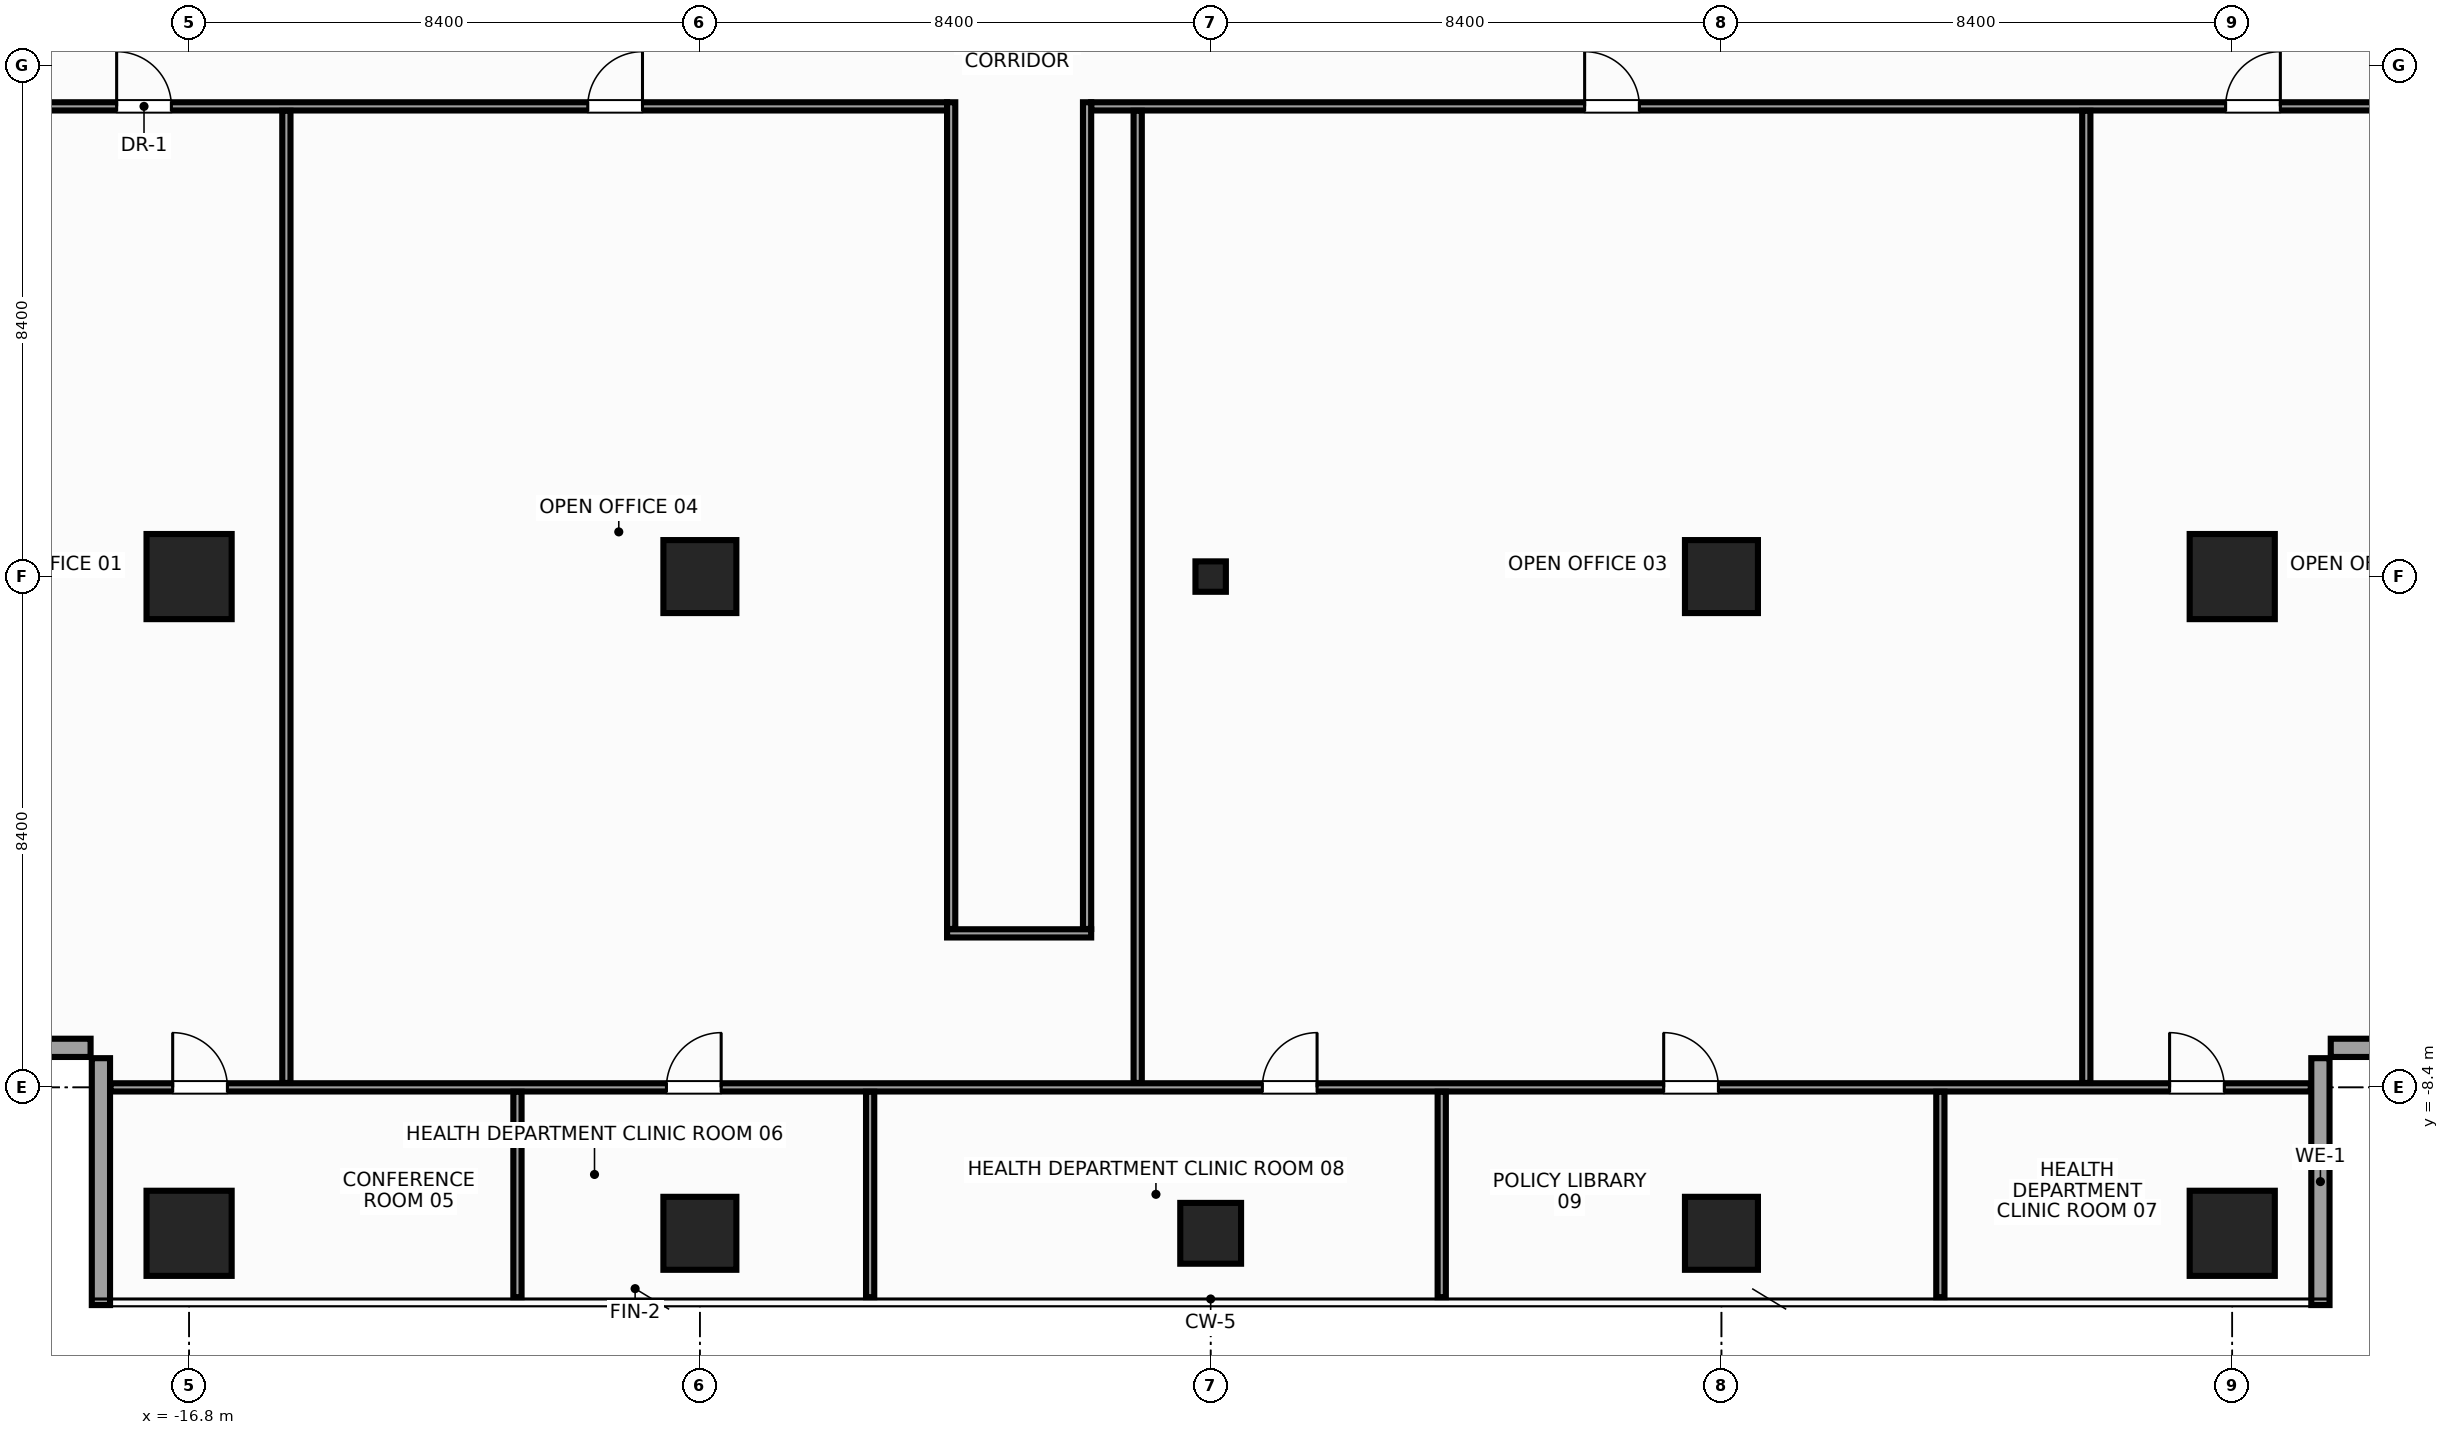
"""IFC4 building model, lengths in metres.
Left out: names, types, materials, properties, quantities, classifications, styles, units other than length and angle.
Written with IfcOpenShell. Run it as: python <this file> out.ifc"""

import sys

from ifc_helpers import new_model, si_unit, direction, frame, frame_2d, origin, origin_with_axes, origin_2d, place, context, subcontext, project, spatial, rectangle, hollow_rectangle, extrude, source, transform, mapped, element, fill, save


model = new_model("IFC4")
c1 = context("Model", 3, precision=1e-05, world=origin(), true_north=direction((0.0, 1.0)))
c2 = subcontext(c1, "Body", "Model", "MODEL_VIEW")
j1 = project(units=[si_unit("LENGTHUNIT", "METRE"), si_unit("PLANEANGLEUNIT", "RADIAN")], contexts=[c1])
p1 = place(None, origin())
s1 = spatial("IfcSite", under=j1, at=p1, CompositionType="ELEMENT")
p2 = place(p1, origin())
s2 = spatial("IfcBuilding", under=s1, at=p2, CompositionType="ELEMENT")
p3 = place(p2, frame((0.0, 0.0, 236.0)))
s3 = spatial("IfcBuildingStorey", under=s2, at=p3, CompositionType="ELEMENT", Elevation=236.0)
m1 = source(origin(), c2, "Body", "SweptSolid", [
    extrude(rectangle(XDim=1.4, YDim=1.4, at=origin_2d()), origin(), (0.0, 0.0, 1.0), 3.6),
])
for number, where, z_axis, x_axis in (
    (1, (-16.8, -10.8, 0.0), (0.0, 0.0, 1.0), (1.0, 0.0, 0.0)),
    (2, (-16.8, 0.0, 0.0), (0.0, 0.0, 1.0), (1.0, 0.0, 0.0)),
    (3, (16.8, -10.8, 0.0), (0.0, 0.0, 1.0), (1.0, 0.0, 0.0)),
    (4, (16.8, 0.0, 0.0), (0.0, 0.0, 1.0), (1.0, 0.0, 0.0)),
):
    element("IfcColumn", number, at=place(p3, frame(where, z_axis=z_axis, x_axis=x_axis)), inside=s3, PredefinedType="COLUMN", context=c2, shape_type="MappedRepresentation", body=[
        mapped(m1, transform((0.0, 0.0, 0.0), x_axis=(1.0, 0.0, 0.0), y_axis=(0.0, 1.0, 0.0), z_axis=(0.0, 0.0, 1.0), scale=1.0)),
    ])
m2 = source(origin(), c2, "Body", "SweptSolid", [
    extrude(rectangle(XDim=1.2, YDim=1.2, at=origin_2d()), origin(), (0.0, 0.0, 1.0), 3.6),
])
for number, where, z_axis, x_axis in (
    (5, (-8.4, 0.0, 0.0), (0.0, 0.0, 1.0), (1.0, 0.0, 0.0)),
    (6, (-8.4, -10.8, 0.0), (0.0, 0.0, 1.0), (1.0, 0.0, 0.0)),
    (7, (8.4, 0.0, 0.0), (0.0, 0.0, 1.0), (1.0, 0.0, 0.0)),
    (8, (8.4, -10.8, 0.0), (0.0, 0.0, 1.0), (1.0, 0.0, 0.0)),
):
    element("IfcColumn", number, at=place(p3, frame(where, z_axis=z_axis, x_axis=x_axis)), inside=s3, PredefinedType="COLUMN", context=c2, shape_type="MappedRepresentation", body=[
        mapped(m2, transform((0.0, 0.0, 0.0), x_axis=(1.0, 0.0, 0.0), y_axis=(0.0, 1.0, 0.0), z_axis=(0.0, 0.0, 1.0), scale=1.0)),
    ])
m3 = source(origin(), c2, "Body", "SweptSolid", [
    extrude(rectangle(XDim=1.0, YDim=1.0, at=origin_2d()), origin(), (0.0, 0.0, 1.0), 3.6),
])
p4 = place(p3, frame((0.0, -10.8, 0.0), z_axis=(0.0, 0.0, 1.0), x_axis=(1.0, 0.0, 0.0)))
e9 = element("IfcColumn", 9, at=p4, inside=s3, PredefinedType="COLUMN", context=c2, shape_type="MappedRepresentation", body=[
    mapped(m3, transform((0.0, 0.0, 0.0), x_axis=(1.0, 0.0, 0.0), y_axis=(0.0, 1.0, 0.0), z_axis=(0.0, 0.0, 1.0), scale=1.0)),
])
m4 = source(origin(), c2, "Body", "SweptSolid", [
    extrude(hollow_rectangle(XDim=0.5, YDim=0.5, WallThickness=0.025, at=origin_2d()), origin(), (0.0, 0.0, 1.0), 3.6),
])
p5 = place(p3, origin_with_axes())
e10 = element("IfcColumn", 10, at=p5, inside=s3, PredefinedType="COLUMN", context=c2, shape_type="MappedRepresentation", body=[
    mapped(m4, transform((0.0, 0.0, 0.0), x_axis=(1.0, 0.0, 0.0), y_axis=(0.0, 1.0, 0.0), z_axis=(0.0, 0.0, 1.0), scale=1.0)),
])
m5 = source(origin(), c2, "Body", "SweptSolid", [
    extrude(rectangle(XDim=4.06, YDim=0.3, at=frame_2d((2.03, 0.0))), origin(), (0.0, 0.0, 1.0), 2.75),
])
for number, where, z_axis, x_axis in (
    (11, (18.25, -11.98, 0.0), (0.0, 0.0, 1.0), (0.0, 1.0, 0.0)),
    (12, (18.42, -7.75, 0.0), (0.0, 0.0, 1.0), (1.0, 0.0, 0.0)),
    (13, (-22.48, -7.75, 0.0), (0.0, 0.0, 1.0), (1.0, 0.0, 0.0)),
    (14, (-18.25, -7.92, 0.0), (0.0, 0.0, 1.0), (0.0, -1.0, 0.0)),
):
    element("IfcWall", number, at=place(p3, frame(where, z_axis=z_axis, x_axis=x_axis)), inside=s3, PredefinedType="STANDARD", context=c2, shape_type="MappedRepresentation", body=[
        mapped(m5, transform((0.0, 0.0, 0.0), x_axis=(1.0, 0.0, 0.0), y_axis=(0.0, 1.0, 0.0), z_axis=(0.0, 0.0, 1.0), scale=1.0)),
    ])
m6 = source(origin(), c2, "Body", "SweptSolid", [
    extrude(rectangle(XDim=15.6, YDim=0.135, at=frame_2d((7.8, 0.0))), origin(), (0.0, 0.0, 1.0), 2.755),
])
p6 = place(p3, frame((-19.935, 7.732, 0.0), z_axis=(0.0, 0.0, 1.0), x_axis=(1.0, 0.0, 0.0)))
e15 = element("IfcWall", 15, at=p6, inside=s3, PredefinedType="PARTITIONING", context=c2, shape_type="MappedRepresentation", body=[
    mapped(m6, transform((0.0, 0.0, 0.0), x_axis=(1.0, 0.0, 0.0), y_axis=(0.0, 1.0, 0.0), z_axis=(0.0, 0.0, 1.0), scale=1.0)),
])
p7 = place(p6, frame((1.944, 0.0, 0.0)))
e16 = element("IfcOpeningElement", 16, at=p7, cuts=e15, PredefinedType="OPENING", context=c2, shape_type="SweptSolid", body=[
    extrude(rectangle(XDim=0.9, YDim=2.15, at=frame_2d((0.45, 1.075))), frame((0.0, 0.08, 0.0), z_axis=(0.0, -1.0, 0.0), x_axis=(1.0, 0.0, 0.0)), (0.0, 0.0, 1.0), 0.159),
])
p8 = place(p6, frame((9.691, 0.0, 0.0)))
e17 = element("IfcOpeningElement", 17, at=p8, cuts=e15, PredefinedType="OPENING", context=c2, shape_type="SweptSolid", body=[
    extrude(rectangle(XDim=0.9, YDim=2.15, at=frame_2d((0.45, 1.075))), frame((0.0, 0.08, 0.0), z_axis=(0.0, -1.0, 0.0), x_axis=(1.0, 0.0, 0.0)), (0.0, 0.0, 1.0), 0.159),
])
m7 = source(origin(), c2, "Body", "SweptSolid", [
    extrude(rectangle(XDim=21.9, YDim=0.135, at=frame_2d((10.95, 0.0))), origin(), (0.0, 0.0, 1.0), 2.755),
])
p9 = place(p3, frame((-1.965, 7.732, 0.0), z_axis=(0.0, 0.0, 1.0), x_axis=(1.0, 0.0, 0.0)))
e18 = element("IfcWall", 18, at=p9, inside=s3, PredefinedType="PARTITIONING", context=c2, shape_type="MappedRepresentation", body=[
    mapped(m7, transform((0.0, 0.0, 0.0), x_axis=(1.0, 0.0, 0.0), y_axis=(0.0, 1.0, 0.0), z_axis=(0.0, 0.0, 1.0), scale=1.0)),
])
p10 = place(p9, frame((18.656, 0.0, 0.0)))
e19 = element("IfcOpeningElement", 19, at=p10, cuts=e18, PredefinedType="OPENING", context=c2, shape_type="SweptSolid", body=[
    extrude(rectangle(XDim=0.9, YDim=2.15, at=frame_2d((0.45, 1.075))), frame((0.0, 0.08, 0.0), z_axis=(0.0, -1.0, 0.0), x_axis=(1.0, 0.0, 0.0)), (0.0, 0.0, 1.0), 0.159),
])
p11 = place(p9, frame((8.115, 0.0, 0.0)))
e20 = element("IfcOpeningElement", 20, at=p11, cuts=e18, PredefinedType="OPENING", context=c2, shape_type="SweptSolid", body=[
    extrude(rectangle(XDim=0.9, YDim=2.15, at=frame_2d((0.45, 1.075))), frame((0.0, 0.08, 0.0), z_axis=(0.0, -1.0, 0.0), x_axis=(1.0, 0.0, 0.0)), (0.0, 0.0, 1.0), 0.159),
])
m8 = source(origin(), c2, "Body", "SweptSolid", [
    extrude(rectangle(XDim=2.37, YDim=0.135, at=frame_2d((1.185, 0.0))), origin(), (0.0, 0.0, 1.0), 3.37),
])
p12 = place(p3, frame((-4.335, -5.867, 0.0), z_axis=(0.0, 0.0, 1.0), x_axis=(1.0, 0.0, 0.0)))
e21 = element("IfcWall", 21, at=p12, inside=s3, PredefinedType="PARTITIONING", context=c2, shape_type="MappedRepresentation", body=[
    mapped(m8, transform((0.0, 0.0, 0.0), x_axis=(1.0, 0.0, 0.0), y_axis=(0.0, 1.0, 0.0), z_axis=(0.0, 0.0, 1.0), scale=1.0)),
])
m9 = source(origin(), c2, "Body", "SweptSolid", [
    extrude(rectangle(XDim=13.595, YDim=0.135, at=frame_2d((6.797, 0.0))), origin(), (0.0, 0.0, 1.0), 2.655),
])
for number, where, z_axis, x_axis in (
    (22, (-4.268, -5.795, 0.0), (0.0, 0.0, 1.0), (0.0, 1.0, 0.0)),
    (23, (-2.032, -5.795, 0.0), (0.0, 0.0, 1.0), (0.0, 1.0, 0.0)),
):
    element("IfcWall", number, at=place(p3, frame(where, z_axis=z_axis, x_axis=x_axis)), inside=s3, PredefinedType="PARTITIONING", context=c2, shape_type="MappedRepresentation", body=[
        mapped(m9, transform((0.0, 0.0, 0.0), x_axis=(1.0, 0.0, 0.0), y_axis=(0.0, 1.0, 0.0), z_axis=(0.0, 0.0, 1.0), scale=1.0)),
    ])
m10 = source(origin(), c2, "Body", "SweptSolid", [
    extrude(rectangle(XDim=36.184, YDim=0.135, at=frame_2d((18.092, 0.0))), origin(), (0.0, 0.0, 1.0), 2.755),
])
p13 = place(p3, frame((-18.092, -8.4, 0.0), z_axis=(0.0, 0.0, 1.0), x_axis=(1.0, 0.0, 0.0)))
e24 = element("IfcWall", 24, at=p13, inside=s3, PredefinedType="PARTITIONING", context=c2, shape_type="MappedRepresentation", body=[
    mapped(m10, transform((0.0, 0.0, 0.0), x_axis=(1.0, 0.0, 0.0), y_axis=(0.0, 1.0, 0.0), z_axis=(0.0, 0.0, 1.0), scale=1.0)),
])
p14 = place(p13, frame((1.022, 0.0, 0.0)))
e25 = element("IfcOpeningElement", 25, at=p14, cuts=e24, PredefinedType="OPENING", context=c2, shape_type="SweptSolid", body=[
    extrude(rectangle(XDim=0.9, YDim=2.15, at=frame_2d((0.45, 1.075))), frame((0.0, 0.08, 0.0), z_axis=(0.0, -1.0, 0.0), x_axis=(1.0, 0.0, 0.0)), (0.0, 0.0, 1.0), 0.159),
])
p15 = place(p13, frame((9.142, 0.0, 0.0)))
e26 = element("IfcOpeningElement", 26, at=p15, cuts=e24, PredefinedType="OPENING", context=c2, shape_type="SweptSolid", body=[
    extrude(rectangle(XDim=0.9, YDim=2.15, at=frame_2d((0.45, 1.075))), frame((0.0, 0.08, 0.0), z_axis=(0.0, -1.0, 0.0), x_axis=(1.0, 0.0, 0.0)), (0.0, 0.0, 1.0), 0.159),
])
p16 = place(p13, frame((33.862, 0.0, 0.0)))
e27 = element("IfcOpeningElement", 27, at=p16, cuts=e24, PredefinedType="OPENING", context=c2, shape_type="SweptSolid", body=[
    extrude(rectangle(XDim=0.9, YDim=2.15, at=frame_2d((0.45, 1.075))), frame((0.0, 0.08, 0.0), z_axis=(0.0, -1.0, 0.0), x_axis=(1.0, 0.0, 0.0)), (0.0, 0.0, 1.0), 0.159),
])
p17 = place(p13, frame((18.942, 0.0, 0.0)))
e28 = element("IfcOpeningElement", 28, at=p17, cuts=e24, PredefinedType="OPENING", context=c2, shape_type="SweptSolid", body=[
    extrude(rectangle(XDim=0.9, YDim=2.15, at=frame_2d((0.45, 1.075))), frame((0.0, 0.08, 0.0), z_axis=(0.0, -1.0, 0.0), x_axis=(1.0, 0.0, 0.0)), (0.0, 0.0, 1.0), 0.159),
])
p18 = place(p13, frame((25.542, 0.0, 0.0)))
e29 = element("IfcOpeningElement", 29, at=p18, cuts=e24, PredefinedType="OPENING", context=c2, shape_type="SweptSolid", body=[
    extrude(rectangle(XDim=0.9, YDim=2.15, at=frame_2d((0.45, 1.075))), frame((0.0, 0.08, 0.0), z_axis=(0.0, -1.0, 0.0), x_axis=(1.0, 0.0, 0.0)), (0.0, 0.0, 1.0), 0.159),
])
m11 = source(origin(), c2, "Body", "SweptSolid", [
    extrude(rectangle(XDim=15.987, YDim=0.135, at=frame_2d((7.994, 0.0))), origin(), (0.0, 0.0, 1.0), 2.655),
])
for number, where, z_axis, x_axis in (
    (30, (-15.2, -8.327, 0.0), (0.0, 0.0, 1.0), (0.0, 1.0, 0.0)),
    (31, (-1.2, -8.327, 0.0), (0.0, 0.0, 1.0), (0.0, 1.0, 0.0)),
    (32, (14.4, -8.327, 0.0), (0.0, 0.0, 1.0), (0.0, 1.0, 0.0)),
):
    element("IfcWall", number, at=place(p3, frame(where, z_axis=z_axis, x_axis=x_axis)), inside=s3, PredefinedType="PARTITIONING", context=c2, shape_type="MappedRepresentation", body=[
        mapped(m11, transform((0.0, 0.0, 0.0), x_axis=(1.0, 0.0, 0.0), y_axis=(0.0, 1.0, 0.0), z_axis=(0.0, 0.0, 1.0), scale=1.0)),
    ])
m12 = source(origin(), c2, "Body", "SweptSolid", [
    extrude(rectangle(XDim=3.378, YDim=0.135, at=frame_2d((1.689, 0.0))), origin(), (0.0, 0.0, 1.0), 2.905),
])
for number, where, z_axis, x_axis in (
    (33, (-11.4, -11.85, 0.0), (0.0, 0.0, 1.0), (0.0, 1.0, 0.0)),
    (34, (-5.6, -11.85, 0.0), (0.0, 0.0, 1.0), (0.0, 1.0, 0.0)),
    (35, (3.8, -11.85, 0.0), (0.0, 0.0, 1.0), (0.0, 1.0, 0.0)),
    (36, (12.0, -11.85, 0.0), (0.0, 0.0, 1.0), (0.0, 1.0, 0.0)),
):
    element("IfcWall", number, at=place(p3, frame(where, z_axis=z_axis, x_axis=x_axis)), inside=s3, PredefinedType="PARTITIONING", context=c2, shape_type="MappedRepresentation", body=[
        mapped(m12, transform((0.0, 0.0, 0.0), x_axis=(1.0, 0.0, 0.0), y_axis=(0.0, 1.0, 0.0), z_axis=(0.0, 0.0, 1.0), scale=1.0)),
    ])
m13 = source(origin(), c2, "Body", "SweptSolid", [
    extrude(rectangle(XDim=0.9, YDim=2.15, at=frame_2d((0.45, 1.075))), frame((0.0, 0.025, 0.0), z_axis=(0.0, -1.0, 0.0), x_axis=(1.0, 0.0, 0.0)), (0.0, 0.0, 1.0), 0.05),
])
p19 = place(p7, origin())
e37 = element("IfcDoor", 37, at=p19, inside=s3, OperationType="SINGLE_SWING_LEFT", PredefinedType="DOOR", context=c2, shape_type="MappedRepresentation", body=[
    mapped(m13, transform((0.0, 0.0, 0.0), x_axis=(1.0, 0.0, 0.0), y_axis=(0.0, 1.0, 0.0), z_axis=(0.0, 0.0, 1.0), scale=1.0)),
])
fill(e16, e37)
p20 = place(p10, origin())
e38 = element("IfcDoor", 38, at=p20, inside=s3, OperationType="SINGLE_SWING_RIGHT", PredefinedType="DOOR", context=c2, shape_type="MappedRepresentation", body=[
    mapped(m13, transform((0.0, 0.0, 0.0), x_axis=(1.0, 0.0, 0.0), y_axis=(0.0, 1.0, 0.0), z_axis=(0.0, 0.0, 1.0), scale=1.0)),
])
fill(e19, e38)
p21 = place(p11, origin())
e39 = element("IfcDoor", 39, at=p21, inside=s3, OperationType="SINGLE_SWING_LEFT", PredefinedType="DOOR", context=c2, shape_type="MappedRepresentation", body=[
    mapped(m13, transform((0.0, 0.0, 0.0), x_axis=(1.0, 0.0, 0.0), y_axis=(0.0, 1.0, 0.0), z_axis=(0.0, 0.0, 1.0), scale=1.0)),
])
fill(e20, e39)
p22 = place(p8, origin())
e40 = element("IfcDoor", 40, at=p22, inside=s3, OperationType="SINGLE_SWING_RIGHT", PredefinedType="DOOR", context=c2, shape_type="MappedRepresentation", body=[
    mapped(m13, transform((0.0, 0.0, 0.0), x_axis=(1.0, 0.0, 0.0), y_axis=(0.0, 1.0, 0.0), z_axis=(0.0, 0.0, 1.0), scale=1.0)),
])
fill(e17, e40)
p23 = place(p14, origin())
e41 = element("IfcDoor", 41, at=p23, inside=s3, OperationType="SINGLE_SWING_LEFT", PredefinedType="DOOR", context=c2, shape_type="MappedRepresentation", body=[
    mapped(m13, transform((0.0, 0.0, 0.0), x_axis=(1.0, 0.0, 0.0), y_axis=(0.0, 1.0, 0.0), z_axis=(0.0, 0.0, 1.0), scale=1.0)),
])
fill(e25, e41)
p24 = place(p15, origin())
e42 = element("IfcDoor", 42, at=p24, inside=s3, OperationType="SINGLE_SWING_RIGHT", PredefinedType="DOOR", context=c2, shape_type="MappedRepresentation", body=[
    mapped(m13, transform((0.0, 0.0, 0.0), x_axis=(1.0, 0.0, 0.0), y_axis=(0.0, 1.0, 0.0), z_axis=(0.0, 0.0, 1.0), scale=1.0)),
])
fill(e26, e42)
p25 = place(p16, origin())
e43 = element("IfcDoor", 43, at=p25, inside=s3, OperationType="SINGLE_SWING_LEFT", PredefinedType="DOOR", context=c2, shape_type="MappedRepresentation", body=[
    mapped(m13, transform((0.0, 0.0, 0.0), x_axis=(1.0, 0.0, 0.0), y_axis=(0.0, 1.0, 0.0), z_axis=(0.0, 0.0, 1.0), scale=1.0)),
])
fill(e27, e43)
p26 = place(p17, origin())
e44 = element("IfcDoor", 44, at=p26, inside=s3, OperationType="SINGLE_SWING_RIGHT", PredefinedType="DOOR", context=c2, shape_type="MappedRepresentation", body=[
    mapped(m13, transform((0.0, 0.0, 0.0), x_axis=(1.0, 0.0, 0.0), y_axis=(0.0, 1.0, 0.0), z_axis=(0.0, 0.0, 1.0), scale=1.0)),
])
fill(e28, e44)
p27 = place(p18, origin())
e45 = element("IfcDoor", 45, at=p27, inside=s3, OperationType="SINGLE_SWING_LEFT", PredefinedType="DOOR", context=c2, shape_type="MappedRepresentation", body=[
    mapped(m13, transform((0.0, 0.0, 0.0), x_axis=(1.0, 0.0, 0.0), y_axis=(0.0, 1.0, 0.0), z_axis=(0.0, 0.0, 1.0), scale=1.0)),
])
fill(e29, e45)
save(model, sys.argv[1])
